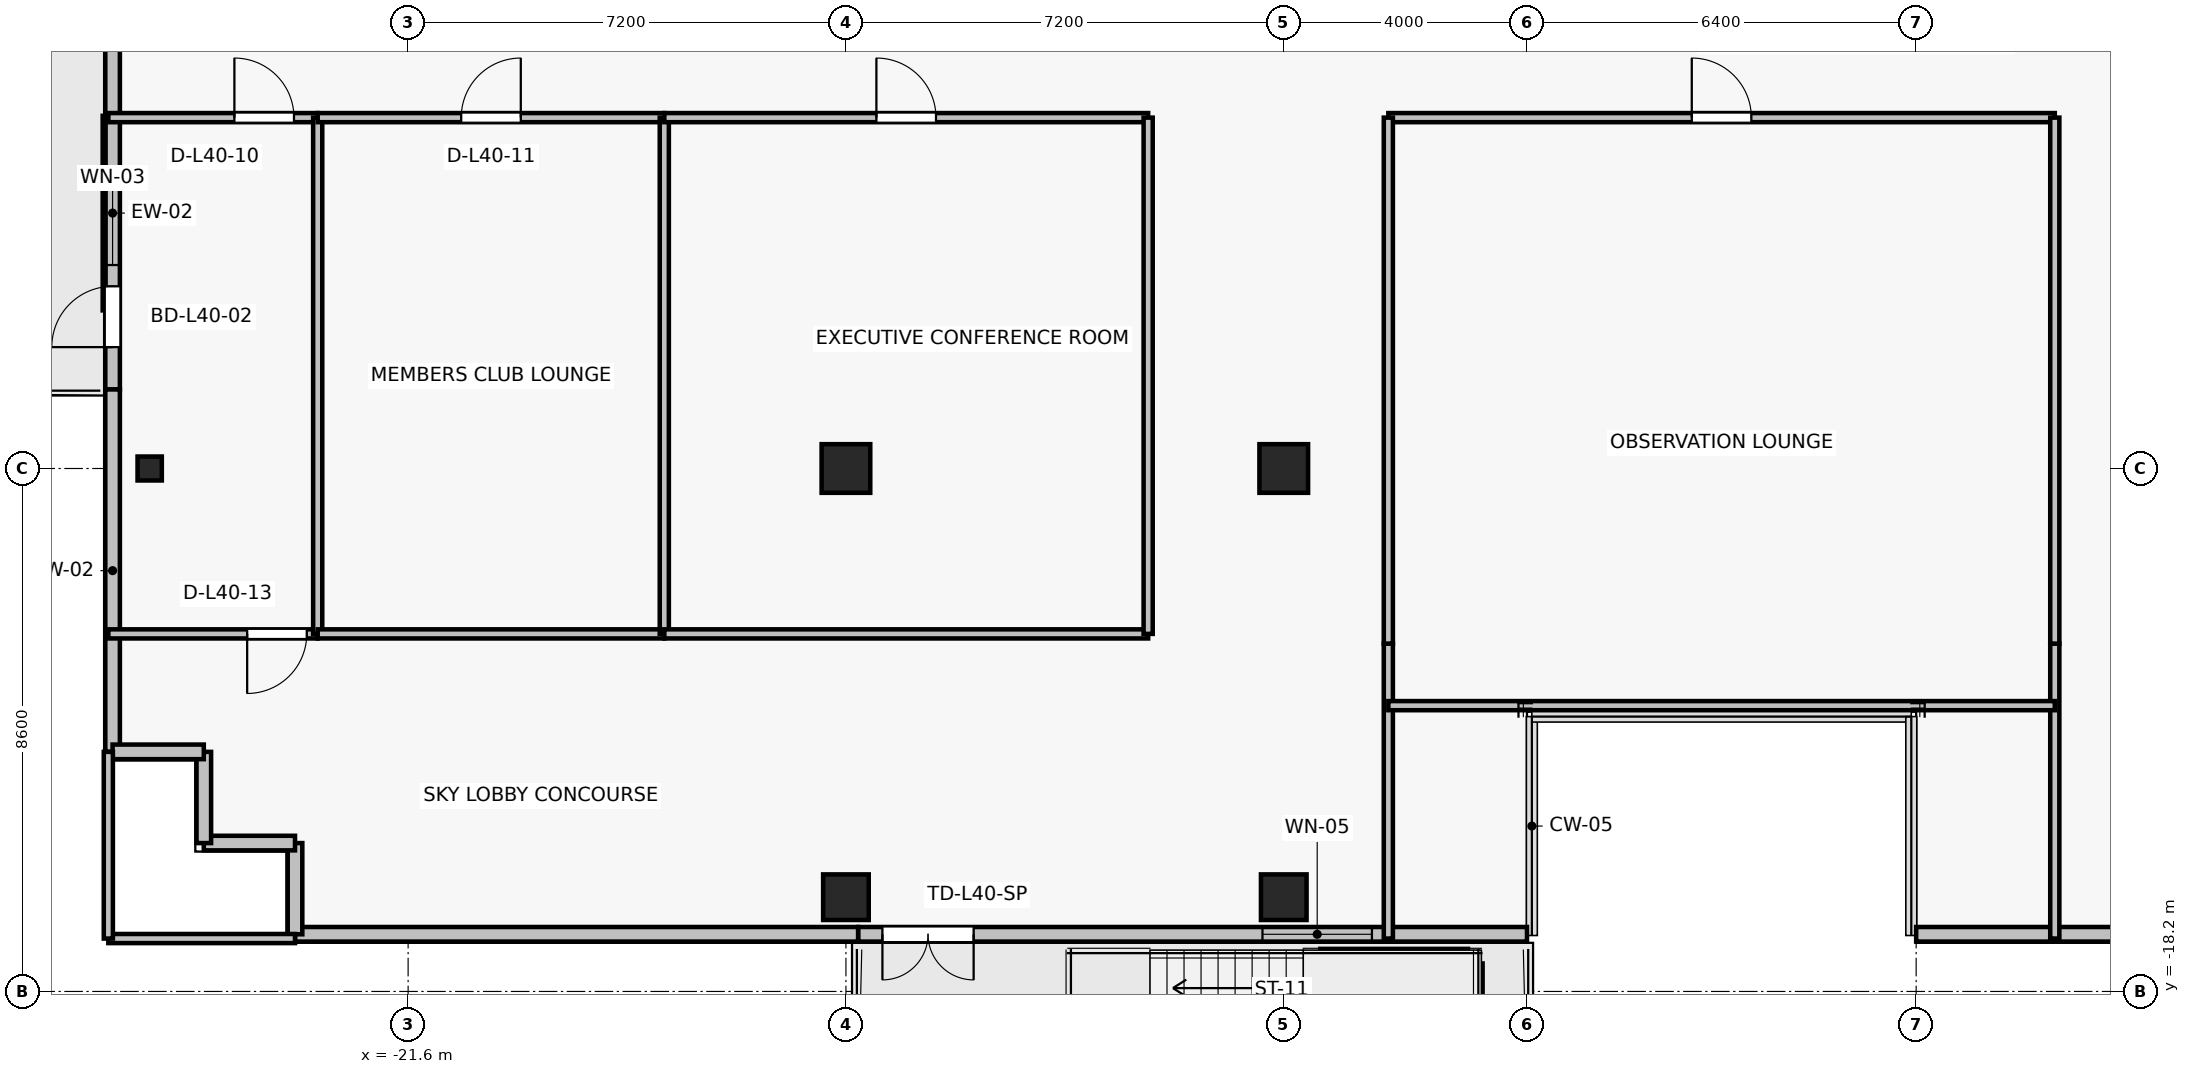
"""IFC4 building model, lengths in metres.
Left out: names, types, materials, properties, quantities, classifications, styles, units other than length and angle.
Written with IfcOpenShell. Run it as: python <this file> out.ifc"""

import sys

from ifc_helpers import new_model, si_unit, direction, frame, frame_2d, origin, origin_2d, place, context, subcontext, project, spatial, rectangle, i_section, extrude, source, transform, mapped, element, fill, save


model = new_model("IFC4")
c1 = context("Model", 3, precision=1e-05, world=origin(), true_north=direction((0.0, 1.0)))
c2 = subcontext(c1, "Body", "Model", "MODEL_VIEW")
j1 = project(units=[si_unit("LENGTHUNIT", "METRE"), si_unit("PLANEANGLEUNIT", "RADIAN")], contexts=[c1])
p1 = place(None, origin())
s1 = spatial("IfcSite", under=j1, at=p1, CompositionType="ELEMENT")
p2 = place(p1, origin())
s2 = spatial("IfcBuilding", under=s1, at=p2, CompositionType="ELEMENT")
p3 = place(p2, frame((0.0, 0.0, 146.2)))
s3 = spatial("IfcBuildingStorey", under=s2, at=p3, CompositionType="ELEMENT", Elevation=146.2)
for number, where, z_axis, x_axis in (
    (1, (-14.4, -9.6, 0.0), (0.0, 0.0, 1.0), (1.0, 0.0, 0.0)),
    (2, (-7.2, -9.6, 0.0), (0.0, 0.0, 1.0), (1.0, 0.0, 0.0)),
):
    element("IfcColumn", number, at=place(p3, frame(where, z_axis=z_axis, x_axis=x_axis)), inside=s3, PredefinedType="COLUMN", context=c2, shape_type="SweptSolid", body=[
        extrude(rectangle(XDim=0.8, YDim=0.8, at=origin_2d()), origin(), (0.0, 0.0, 1.0), 3.3),
    ])
for number, where, z_axis, x_axis in (
    (3, (-14.4, -16.65, 0.0), (0.0, 0.0, 1.0), (1.0, 0.0, 0.0)),
    (4, (-7.2, -16.65, 0.0), (0.0, 0.0, 1.0), (1.0, 0.0, 0.0)),
):
    element("IfcColumn", number, at=place(p3, frame(where, z_axis=z_axis, x_axis=x_axis)), inside=s3, PredefinedType="COLUMN", context=c2, shape_type="SweptSolid", body=[
        extrude(rectangle(XDim=0.75, YDim=0.75, at=origin_2d()), origin(), (0.0, 0.0, 1.0), 3.3),
    ])
p4 = place(p3, frame((-25.85, -9.6, 0.0), z_axis=(0.0, 0.0, 1.0), x_axis=(1.0, 0.0, 0.0)))
e5 = element("IfcColumn", 5, at=p4, inside=s3, PredefinedType="COLUMN", context=c2, shape_type="SweptSolid", body=[
    extrude(i_section(OverallWidth=0.399, OverallDepth=0.394, WebThickness=0.023, FlangeThickness=0.037, FilletRadius=0.015, at=origin_2d()), origin(), (0.0, 0.0, 1.0), 3.3),
])
p5 = place(p3, frame((-26.46, -8.3, 0.0), z_axis=(0.0, 0.0, 1.0), x_axis=(0.0, 1.0, 0.0)))
e6 = element("IfcWall", 6, at=p5, inside=s3, PredefinedType="SOLIDWALL", context=c2, shape_type="SweptSolid", body=[
    extrude(rectangle(XDim=5.8, YDim=0.24, at=frame_2d((2.9, 0.0))), origin(), (0.0, 0.0, 1.0), 3.075),
])
p6 = place(p5, frame((0.696, 0.0, 0.0)))
e7 = element("IfcOpeningElement", 7, at=p6, cuts=e6, PredefinedType="OPENING", context=c2, shape_type="SweptSolid", body=[
    extrude(rectangle(XDim=1.0, YDim=2.2, at=frame_2d((0.5, 1.1))), frame((0.0, 0.13, 0.0), z_axis=(0.0, -1.0, 0.0), x_axis=(1.0, 0.0, 0.0)), (0.0, 0.0, 1.0), 0.26),
])
p7 = place(p5, frame((2.046, 0.0, 0.85)))
e8 = element("IfcOpeningElement", 8, at=p7, cuts=e6, PredefinedType="OPENING", context=c2, shape_type="SweptSolid", body=[
    extrude(rectangle(XDim=1.5, YDim=1.6, at=frame_2d((0.75, 0.8))), frame((0.0, 0.13, 0.0), z_axis=(0.0, -1.0, 0.0), x_axis=(1.0, 0.0, 0.0)), (0.0, 0.0, 1.0), 0.26),
])
p8 = place(p3, frame((-3.2, -17.26, 0.0), z_axis=(0.0, 0.0, 1.0), x_axis=(-1.0, 0.0, 0.0)))
e9 = element("IfcWall", 9, at=p8, inside=s3, PredefinedType="SOLIDWALL", context=c2, shape_type="SweptSolid", body=[
    extrude(rectangle(XDim=11.0, YDim=0.24, at=frame_2d((5.5, 0.0))), origin(), (0.0, 0.0, 1.0), 2.59),
])
p9 = place(p8, frame((9.1, 0.0, 0.0)))
e10 = element("IfcOpeningElement", 10, at=p9, cuts=e9, PredefinedType="OPENING", context=c2, shape_type="SweptSolid", body=[
    extrude(rectangle(XDim=1.5, YDim=2.2, at=frame_2d((0.75, 1.1))), frame((0.0, 0.13, 0.0), z_axis=(0.0, -1.0, 0.0), x_axis=(1.0, 0.0, 0.0)), (0.0, 0.0, 1.0), 0.26),
])
p10 = place(p8, frame((2.55, 0.0, 0.85)))
e11 = element("IfcOpeningElement", 11, at=p10, cuts=e9, PredefinedType="OPENING", context=c2, shape_type="SweptSolid", body=[
    extrude(rectangle(XDim=1.8, YDim=1.6, at=frame_2d((0.9, 0.8))), frame((0.0, 0.13, 0.0), z_axis=(0.0, -1.0, 0.0), x_axis=(1.0, 0.0, 0.0)), (0.0, 0.0, 1.0), 0.26),
])
p11 = place(p3, frame((-26.46, -8.3, 0.0), z_axis=(0.0, 0.0, 1.0), x_axis=(0.0, -1.0, 0.0)))
e12 = element("IfcWall", 12, at=p11, inside=s3, PredefinedType="SOLIDWALL", context=c2, shape_type="SweptSolid", body=[
    extrude(rectangle(XDim=5.96, YDim=0.24, at=frame_2d((2.98, 0.0))), origin(), (0.0, 0.0, 1.0), 3.075),
])
p12 = place(p3, frame((3.2, -17.26, 0.0), z_axis=(0.0, 0.0, 1.0), x_axis=(1.0, 0.0, 0.0)))
e13 = element("IfcWall", 13, at=p12, inside=s3, PredefinedType="SOLIDWALL", context=c2, shape_type="SweptSolid", body=[
    extrude(rectangle(XDim=3.85, YDim=0.24, at=frame_2d((1.925, 0.0))), origin(), (0.0, 0.0, 1.0), 3.075),
])
p13 = place(p3, frame((-23.46, -17.26, 0.0), z_axis=(0.0, 0.0, 1.0), x_axis=(1.0, 0.0, 0.0)))
e14 = element("IfcWall", 14, at=p13, inside=s3, PredefinedType="SOLIDWALL", context=c2, shape_type="SweptSolid", body=[
    extrude(rectangle(XDim=9.26, YDim=0.24, at=frame_2d((4.63, 0.0))), origin(), (0.0, 0.0, 1.0), 3.075),
])
for number, where, z_axis, x_axis in (
    (15, (-23.46, -15.76, 0.0), (0.0, 0.0, 1.0), (0.0, -1.0, 0.0)),
    (16, (-24.96, -15.76, 0.0), (0.0, 0.0, 1.0), (1.0, 0.0, 0.0)),
    (17, (-24.96, -14.26, 0.0), (0.0, 0.0, 1.0), (0.0, -1.0, 0.0)),
    (18, (-26.46, -14.26, 0.0), (0.0, 0.0, 1.0), (1.0, 0.0, 0.0)),
):
    element("IfcWall", number, at=place(p3, frame(where, z_axis=z_axis, x_axis=x_axis)), inside=s3, PredefinedType="SOLIDWALL", context=c2, shape_type="SweptSolid", body=[
        extrude(rectangle(XDim=1.5, YDim=0.24, at=frame_2d((0.75, 0.0))), origin(), (0.0, 0.0, 1.0), 3.075),
    ])
p14 = place(p3, frame((-4.03, -19.92, -0.25), z_axis=(0.0, 0.0, 1.0), x_axis=(0.0, 1.0, 0.0)))
e19 = element("IfcWall", 19, at=p14, inside=s3, PredefinedType="SOLIDWALL", context=c2, shape_type="SweptSolid", body=[
    extrude(rectangle(XDim=2.18, YDim=0.2, at=frame_2d((1.09, 0.0))), origin(), (0.0, 0.0, 1.0), 1.7),
])
p15 = place(p3, frame((-6.6, -17.6, -0.25), z_axis=(0.0, 0.0, 1.0), x_axis=(1.0, 0.0, 0.0)))
e20 = element("IfcWall", 20, at=p15, inside=s3, PredefinedType="SOLIDWALL", context=c2, shape_type="SweptSolid", body=[
    extrude(rectangle(XDim=2.43, YDim=0.2, at=frame_2d((1.215, 0.0))), origin(), (0.0, 0.0, 1.0), 1.7),
])
p16 = place(p3, frame((-23.087, -12.32, 0.0), z_axis=(0.0, 0.0, 1.0), x_axis=(-1.0, 0.0, 0.0)))
e21 = element("IfcWall", 21, at=p16, inside=s3, PredefinedType="PARTITIONING", context=c2, shape_type="SweptSolid", body=[
    extrude(rectangle(XDim=3.443, YDim=0.15, at=frame_2d((1.722, 0.0))), origin(), (0.0, 0.0, 1.0), 3.075),
])
p17 = place(p16, frame((0.18, 0.0, 0.0)))
e22 = element("IfcOpeningElement", 22, at=p17, cuts=e21, PredefinedType="OPENING", context=c2, shape_type="SweptSolid", body=[
    extrude(rectangle(XDim=0.98, YDim=2.15, at=frame_2d((0.49, 1.075))), frame((0.0, 0.085, 0.0), z_axis=(0.0, -1.0, 0.0), x_axis=(1.0, 0.0, 0.0)), (0.0, 0.0, 1.0), 0.17),
])
p18 = place(p3, frame((-26.53, -3.83, 0.0), z_axis=(0.0, 0.0, 1.0), x_axis=(1.0, 0.0, 0.0)))
e23 = element("IfcWall", 23, at=p18, inside=s3, PredefinedType="PARTITIONING", context=c2, shape_type="SweptSolid", body=[
    extrude(rectangle(XDim=3.443, YDim=0.15, at=frame_2d((1.722, 0.0))), origin(), (0.0, 0.0, 1.0), 2.565),
])
p19 = place(p18, frame((2.073, 0.0, 0.0)))
e24 = element("IfcOpeningElement", 24, at=p19, cuts=e23, PredefinedType="OPENING", context=c2, shape_type="SweptSolid", body=[
    extrude(rectangle(XDim=0.98, YDim=2.15, at=frame_2d((0.49, 1.075))), frame((0.0, 0.085, 0.0), z_axis=(0.0, -1.0, 0.0), x_axis=(1.0, 0.0, 0.0)), (0.0, 0.0, 1.0), 0.17),
])
p20 = place(p3, frame((-23.087, -3.83, 0.0), z_axis=(0.0, 0.0, 1.0), x_axis=(0.0, -1.0, 0.0)))
e25 = element("IfcWall", 25, at=p20, inside=s3, PredefinedType="PARTITIONING", context=c2, shape_type="SweptSolid", body=[
    extrude(rectangle(XDim=8.49, YDim=0.15, at=frame_2d((4.245, 0.0))), origin(), (0.0, 0.0, 1.0), 2.565),
])
p21 = place(p3, frame((-17.387, -12.32, 0.0), z_axis=(0.0, 0.0, 1.0), x_axis=(-1.0, 0.0, 0.0)))
e26 = element("IfcWall", 26, at=p21, inside=s3, PredefinedType="PARTITIONING", context=c2, shape_type="SweptSolid", body=[
    extrude(rectangle(XDim=5.7, YDim=0.15, at=frame_2d((2.85, 0.0))), origin(), (0.0, 0.0, 1.0), 3.075),
])
p22 = place(p3, frame((-23.087, -3.83, 0.0), z_axis=(0.0, 0.0, 1.0), x_axis=(1.0, 0.0, 0.0)))
e27 = element("IfcWall", 27, at=p22, inside=s3, PredefinedType="PARTITIONING", context=c2, shape_type="SweptSolid", body=[
    extrude(rectangle(XDim=5.7, YDim=0.15, at=frame_2d((2.85, 0.0))), origin(), (0.0, 0.0, 1.0), 3.075),
])
p23 = place(p22, frame((2.36, 0.0, 0.0)))
e28 = element("IfcOpeningElement", 28, at=p23, cuts=e27, PredefinedType="OPENING", context=c2, shape_type="SweptSolid", body=[
    extrude(rectangle(XDim=0.98, YDim=2.15, at=frame_2d((0.49, 1.075))), frame((0.0, 0.085, 0.0), z_axis=(0.0, -1.0, 0.0), x_axis=(1.0, 0.0, 0.0)), (0.0, 0.0, 1.0), 0.17),
])
p24 = place(p3, frame((-17.387, -3.83, 0.0), z_axis=(0.0, 0.0, 1.0), x_axis=(0.0, -1.0, 0.0)))
e29 = element("IfcWall", 29, at=p24, inside=s3, PredefinedType="PARTITIONING", context=c2, shape_type="SweptSolid", body=[
    extrude(rectangle(XDim=8.49, YDim=0.15, at=frame_2d((4.245, 0.0))), origin(), (0.0, 0.0, 1.0), 2.565),
])
p25 = place(p3, frame((-9.43, -12.32, 0.0), z_axis=(0.0, 0.0, 1.0), x_axis=(-1.0, 0.0, 0.0)))
e30 = element("IfcWall", 30, at=p25, inside=s3, PredefinedType="PARTITIONING", context=c2, shape_type="SweptSolid", body=[
    extrude(rectangle(XDim=7.957, YDim=0.15, at=frame_2d((3.979, 0.0))), origin(), (0.0, 0.0, 1.0), 2.565),
])
p26 = place(p3, frame((-17.387, -3.83, 0.0), z_axis=(0.0, 0.0, 1.0), x_axis=(1.0, 0.0, 0.0)))
e31 = element("IfcWall", 31, at=p26, inside=s3, PredefinedType="PARTITIONING", context=c2, shape_type="SweptSolid", body=[
    extrude(rectangle(XDim=7.957, YDim=0.15, at=frame_2d((3.979, 0.0))), origin(), (0.0, 0.0, 1.0), 2.565),
])
p27 = place(p26, frame((3.488, 0.0, 0.0)))
e32 = element("IfcOpeningElement", 32, at=p27, cuts=e31, PredefinedType="OPENING", context=c2, shape_type="SweptSolid", body=[
    extrude(rectangle(XDim=0.98, YDim=2.15, at=frame_2d((0.49, 1.075))), frame((0.0, 0.085, 0.0), z_axis=(0.0, -1.0, 0.0), x_axis=(1.0, 0.0, 0.0)), (0.0, 0.0, 1.0), 0.17),
])
p28 = place(p3, frame((-9.43, -3.83, 0.0), z_axis=(0.0, 0.0, 1.0), x_axis=(0.0, -1.0, 0.0)))
e33 = element("IfcWall", 33, at=p28, inside=s3, PredefinedType="PARTITIONING", context=c2, shape_type="SweptSolid", body=[
    extrude(rectangle(XDim=8.49, YDim=0.15, at=frame_2d((4.245, 0.0))), origin(), (0.0, 0.0, 1.0), 2.565),
])
p29 = place(p3, frame((-23.46, -17.33, 0.0), z_axis=(0.0, 0.0, 1.0), x_axis=(-1.0, 0.0, 0.0)))
e34 = element("IfcWall", 34, at=p29, inside=s3, PredefinedType="PARTITIONING", context=c2, shape_type="SweptSolid", body=[
    extrude(rectangle(XDim=3.07, YDim=0.15, at=frame_2d((1.535, 0.0))), origin(), (0.0, 0.0, 1.0), 2.59),
])
p30 = place(p3, frame((-26.53, -17.33, 0.0), z_axis=(0.0, 0.0, 1.0), x_axis=(0.0, 1.0, 0.0)))
e35 = element("IfcWall", 35, at=p30, inside=s3, PredefinedType="PARTITIONING", context=c2, shape_type="SweptSolid", body=[
    extrude(rectangle(XDim=3.07, YDim=0.15, at=frame_2d((1.535, 0.0))), origin(), (0.0, 0.0, 1.0), 3.075),
])
for number, where, z_axis, x_axis in (
    (36, (-5.48, -12.48, 0.0), (0.0, 0.0, 1.0), (0.0, -1.0, 0.0)),
    (37, (5.48, -17.33, 0.0), (0.0, 0.0, 1.0), (0.0, 1.0, 0.0)),
):
    element("IfcWall", number, at=place(p3, frame(where, z_axis=z_axis, x_axis=x_axis)), inside=s3, PredefinedType="PARTITIONING", context=c2, shape_type="SweptSolid", body=[
        extrude(rectangle(XDim=4.85, YDim=0.15, at=frame_2d((2.425, 0.0))), origin(), (0.0, 0.0, 1.0), 2.565),
    ])
p31 = place(p3, frame((5.48, -13.5, 0.0), z_axis=(0.0, 0.0, 1.0), x_axis=(-1.0, 0.0, 0.0)))
e38 = element("IfcWall", 38, at=p31, inside=s3, PredefinedType="PARTITIONING", context=c2, shape_type="SweptSolid", body=[
    extrude(rectangle(XDim=10.96, YDim=0.15, at=frame_2d((5.48, 0.0))), origin(), (0.0, 0.0, 1.0), 2.565),
])
p32 = place(p3, frame((-5.48, -3.83, 0.0), z_axis=(0.0, 0.0, 1.0), x_axis=(1.0, 0.0, 0.0)))
e39 = element("IfcWall", 39, at=p32, inside=s3, PredefinedType="PARTITIONING", context=c2, shape_type="SweptSolid", body=[
    extrude(rectangle(XDim=10.96, YDim=0.15, at=frame_2d((5.48, 0.0))), origin(), (0.0, 0.0, 1.0), 3.075),
])
p33 = place(p32, frame((4.99, 0.0, 0.0)))
e40 = element("IfcOpeningElement", 40, at=p33, cuts=e39, PredefinedType="OPENING", context=c2, shape_type="SweptSolid", body=[
    extrude(rectangle(XDim=0.98, YDim=2.15, at=frame_2d((0.49, 1.075))), frame((0.0, 0.085, 0.0), z_axis=(0.0, -1.0, 0.0), x_axis=(1.0, 0.0, 0.0)), (0.0, 0.0, 1.0), 0.17),
])
for number, where, z_axis, x_axis in (
    (41, (-5.48, -12.48, 0.0), (0.0, 0.0, 1.0), (0.0, 1.0, 0.0)),
    (42, (5.48, -3.83, 0.0), (0.0, 0.0, 1.0), (0.0, -1.0, 0.0)),
):
    element("IfcWall", number, at=place(p3, frame(where, z_axis=z_axis, x_axis=x_axis)), inside=s3, PredefinedType="PARTITIONING", context=c2, shape_type="SweptSolid", body=[
        extrude(rectangle(XDim=8.65, YDim=0.15, at=frame_2d((4.325, 0.0))), origin(), (0.0, 0.0, 1.0), 2.565),
    ])
m1 = source(origin(), c2, "Body", "SweptSolid", [
    extrude(rectangle(XDim=1.0, YDim=2.2, at=frame_2d((0.5, 1.1))), frame((0.0, 0.025, 0.0), z_axis=(0.0, -1.0, 0.0), x_axis=(1.0, 0.0, 0.0)), (0.0, 0.0, 1.0), 0.05),
])
p34 = place(p6, origin())
e43 = element("IfcDoor", 43, at=p34, inside=s3, OperationType="SINGLE_SWING_LEFT", PredefinedType="DOOR", context=c2, shape_type="MappedRepresentation", body=[
    mapped(m1, transform((0.0, 0.0, 0.0), x_axis=(1.0, 0.0, 0.0), y_axis=(0.0, 1.0, 0.0), z_axis=(0.0, 0.0, 1.0), scale=1.0)),
])
fill(e7, e43)
m2 = source(origin(), c2, "Body", "SweptSolid", [
    extrude(rectangle(XDim=1.5, YDim=1.6, at=frame_2d((0.75, 0.8))), frame((0.0, 0.03, 0.0), z_axis=(0.0, -1.0, 0.0), x_axis=(1.0, 0.0, 0.0)), (0.0, 0.0, 1.0), 0.06),
])
p35 = place(p7, origin())
e44 = element("IfcWindow", 44, at=p35, inside=s3, PartitioningType="SINGLE_PANEL", PredefinedType="WINDOW", context=c2, shape_type="MappedRepresentation", body=[
    mapped(m2, transform((0.0, 0.0, 0.0), x_axis=(1.0, 0.0, 0.0), y_axis=(0.0, 1.0, 0.0), z_axis=(0.0, 0.0, 1.0), scale=1.0)),
])
fill(e8, e44)
m3 = source(origin(), c2, "Body", "SweptSolid", [
    extrude(rectangle(XDim=1.5, YDim=2.2, at=frame_2d((0.75, 1.1))), frame((0.0, 0.025, 0.0), z_axis=(0.0, -1.0, 0.0), x_axis=(1.0, 0.0, 0.0)), (0.0, 0.0, 1.0), 0.05),
])
p36 = place(p9, origin())
e45 = element("IfcDoor", 45, at=p36, inside=s3, OperationType="DOUBLE_DOOR_SINGLE_SWING", PredefinedType="DOOR", context=c2, shape_type="MappedRepresentation", body=[
    mapped(m3, transform((0.0, 0.0, 0.0), x_axis=(1.0, 0.0, 0.0), y_axis=(0.0, 1.0, 0.0), z_axis=(0.0, 0.0, 1.0), scale=1.0)),
])
fill(e10, e45)
m4 = source(origin(), c2, "Body", "SweptSolid", [
    extrude(rectangle(XDim=1.8, YDim=1.6, at=frame_2d((0.9, 0.8))), frame((0.0, 0.03, 0.0), z_axis=(0.0, -1.0, 0.0), x_axis=(1.0, 0.0, 0.0)), (0.0, 0.0, 1.0), 0.06),
])
p37 = place(p10, origin())
e46 = element("IfcWindow", 46, at=p37, inside=s3, PartitioningType="SINGLE_PANEL", PredefinedType="WINDOW", context=c2, shape_type="MappedRepresentation", body=[
    mapped(m4, transform((0.0, 0.0, 0.0), x_axis=(1.0, 0.0, 0.0), y_axis=(0.0, 1.0, 0.0), z_axis=(0.0, 0.0, 1.0), scale=1.0)),
])
fill(e11, e46)
m5 = source(origin(), c2, "Body", "SweptSolid", [
    extrude(rectangle(XDim=0.98, YDim=2.15, at=frame_2d((0.49, 1.075))), frame((0.0, 0.025, 0.0), z_axis=(0.0, -1.0, 0.0), x_axis=(1.0, 0.0, 0.0)), (0.0, 0.0, 1.0), 0.05),
])
p38 = place(p19, origin())
e47 = element("IfcDoor", 47, at=p38, inside=s3, OperationType="SINGLE_SWING_LEFT", PredefinedType="DOOR", context=c2, shape_type="MappedRepresentation", body=[
    mapped(m5, transform((0.0, 0.0, 0.0), x_axis=(1.0, 0.0, 0.0), y_axis=(0.0, 1.0, 0.0), z_axis=(0.0, 0.0, 1.0), scale=1.0)),
])
fill(e24, e47)
p39 = place(p23, origin())
e48 = element("IfcDoor", 48, at=p39, inside=s3, OperationType="SINGLE_SWING_RIGHT", PredefinedType="DOOR", context=c2, shape_type="MappedRepresentation", body=[
    mapped(m5, transform((0.0, 0.0, 0.0), x_axis=(1.0, 0.0, 0.0), y_axis=(0.0, 1.0, 0.0), z_axis=(0.0, 0.0, 1.0), scale=1.0)),
])
fill(e28, e48)
p40 = place(p27, origin())
e49 = element("IfcDoor", 49, at=p40, inside=s3, OperationType="SINGLE_SWING_LEFT", PredefinedType="DOOR", context=c2, shape_type="MappedRepresentation", body=[
    mapped(m5, transform((0.0, 0.0, 0.0), x_axis=(1.0, 0.0, 0.0), y_axis=(0.0, 1.0, 0.0), z_axis=(0.0, 0.0, 1.0), scale=1.0)),
])
fill(e32, e49)
p41 = place(p17, origin())
e50 = element("IfcDoor", 50, at=p41, inside=s3, OperationType="SINGLE_SWING_RIGHT", PredefinedType="DOOR", context=c2, shape_type="MappedRepresentation", body=[
    mapped(m5, transform((0.0, 0.0, 0.0), x_axis=(1.0, 0.0, 0.0), y_axis=(0.0, 1.0, 0.0), z_axis=(0.0, 0.0, 1.0), scale=1.0)),
])
fill(e22, e50)
p42 = place(p33, origin())
e51 = element("IfcDoor", 51, at=p42, inside=s3, OperationType="SINGLE_SWING_LEFT", PredefinedType="DOOR", context=c2, shape_type="MappedRepresentation", body=[
    mapped(m5, transform((0.0, 0.0, 0.0), x_axis=(1.0, 0.0, 0.0), y_axis=(0.0, 1.0, 0.0), z_axis=(0.0, 0.0, 1.0), scale=1.0)),
])
fill(e40, e51)
save(model, sys.argv[1])
